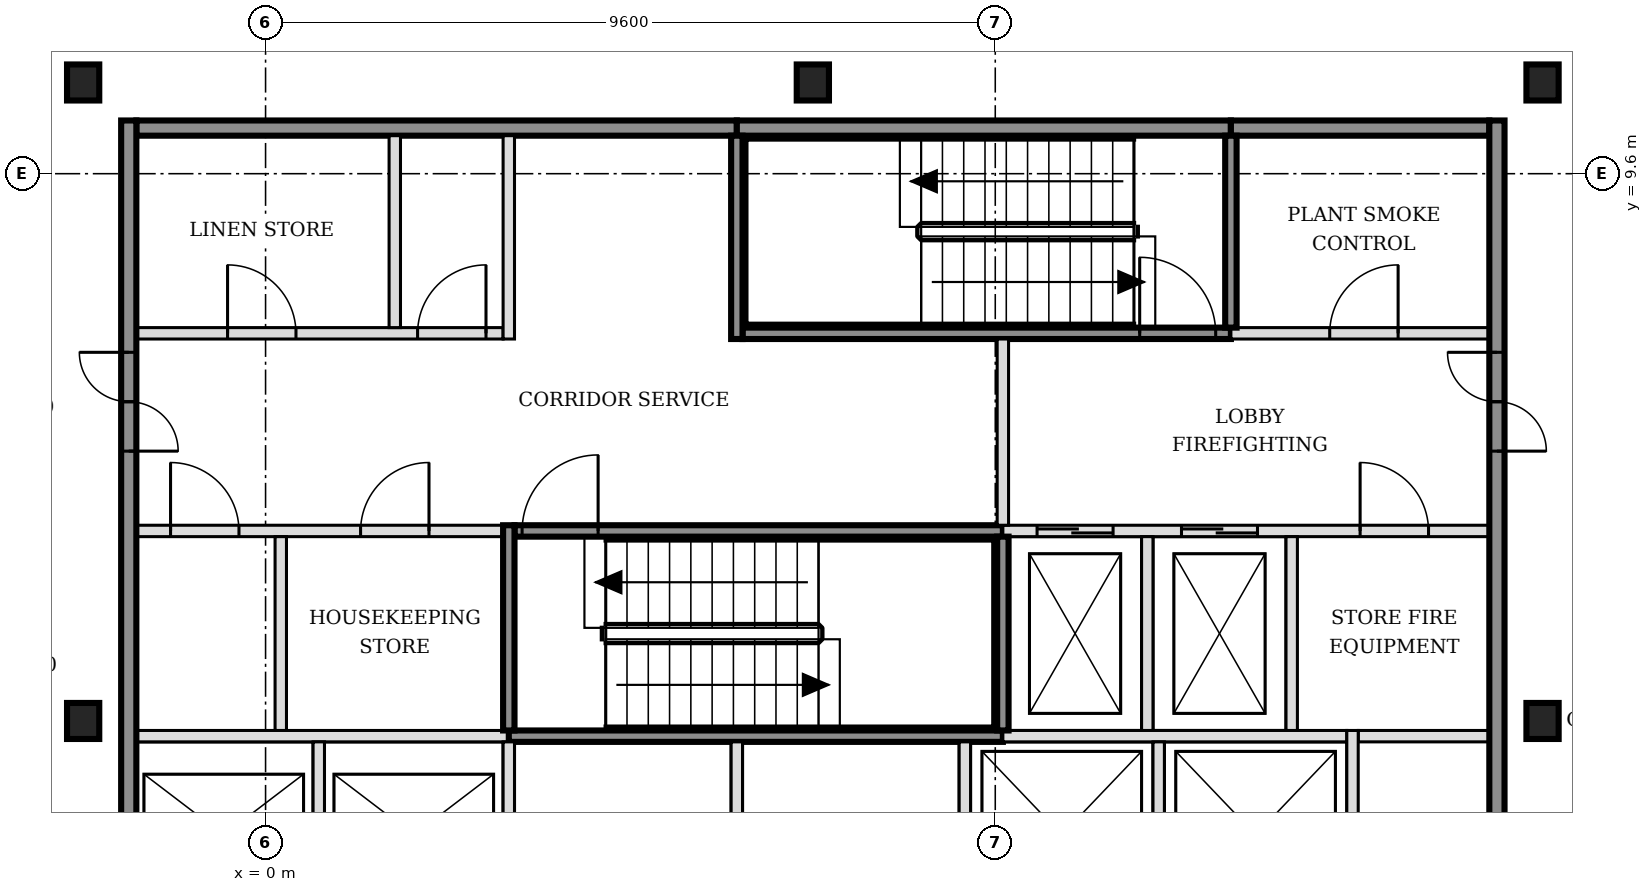
"""IFC4 building model, lengths in metres.
Left out: names, types, materials, properties, quantities, classifications, styles, units other than length and angle.
Written with IfcOpenShell. Run it as: python <this file> out.ifc"""

import sys

from ifc_helpers import new_model, si_unit, direction, frame, frame_2d, origin, origin_2d, place, context, subcontext, project, spatial, rectangle, i_section, extrude, element, fill, save


model = new_model("IFC4")
c1 = context("Model", 3, precision=1e-05, world=origin(), true_north=direction((0.0, 1.0)))
c2 = subcontext(c1, "Body", "Model", "MODEL_VIEW")
j1 = project(units=[si_unit("LENGTHUNIT", "METRE"), si_unit("PLANEANGLEUNIT", "RADIAN")], contexts=[c1])
p1 = place(None, origin())
s1 = spatial("IfcSite", under=j1, at=p1, CompositionType="ELEMENT")
p2 = place(p1, origin())
s2 = spatial("IfcBuilding", under=s1, at=p2, CompositionType="ELEMENT")
p3 = place(p2, frame((0.0, 0.0, 112.2)))
s3 = spatial("IfcBuildingStorey", under=s2, at=p3, CompositionType="ELEMENT", Elevation=112.2)
for number, where, z_axis, x_axis in (
    (1, (-2.4, 2.4, -0.15), (0.0, 0.0, 1.0), (1.0, 0.0, 0.0)),
    (2, (16.8, 2.4, -0.15), (0.0, 0.0, 1.0), (1.0, 0.0, 0.0)),
    (3, (-2.4, 10.8, -0.15), (0.0, 0.0, 1.0), (1.0, 0.0, 0.0)),
    (4, (7.2, 10.8, -0.15), (0.0, 0.0, 1.0), (1.0, 0.0, 0.0)),
    (5, (16.8, 10.8, -0.15), (0.0, 0.0, 1.0), (1.0, 0.0, 0.0)),
):
    element("IfcColumn", number, at=place(p3, frame(where, z_axis=z_axis, x_axis=x_axis)), inside=s3, PredefinedType="COLUMN", context=c2, shape_type="SweptSolid", body=[
        extrude(i_section(OverallWidth=0.424, OverallDepth=0.474, WebThickness=0.048, FlangeThickness=0.077, FilletRadius=0.015, at=origin_2d()), origin(), (0.0, 0.0, 1.0), 3.6),
    ])
p4 = place(p3, frame((-1.7, 2.2, 0.0), z_axis=(0.0, 0.0, 1.0), x_axis=(1.0, 0.0, 0.0)))
e6 = element("IfcWall", 6, at=p4, inside=s3, PredefinedType="SOLIDWALL", context=c2, shape_type="SweptSolid", body=[
    extrude(rectangle(XDim=4.9, YDim=0.15, at=frame_2d((2.45, 0.0))), origin(), (0.0, 0.0, 1.0), 3.45),
])
p5 = place(p3, frame((3.2, 2.2, 0.0), z_axis=(0.0, 0.0, 1.0), x_axis=(1.0, 0.0, 0.0)))
e7 = element("IfcWall", 7, at=p5, inside=s3, PredefinedType="SOLIDWALL", context=c2, shape_type="SweptSolid", body=[
    extrude(rectangle(XDim=6.5, YDim=0.15, at=frame_2d((3.25, 0.0))), origin(), (0.0, 0.0, 1.0), 3.45),
])
p6 = place(p3, frame((9.7, 2.2, 0.0), z_axis=(0.0, 0.0, 1.0), x_axis=(1.0, 0.0, 0.0)))
e8 = element("IfcWall", 8, at=p6, inside=s3, PredefinedType="SOLIDWALL", context=c2, shape_type="SweptSolid", body=[
    extrude(rectangle(XDim=4.525, YDim=0.15, at=frame_2d((2.263, 0.0))), origin(), (0.0, 0.0, 1.0), 3.45),
])
p7 = place(p3, frame((14.375, 2.2, 0.0), z_axis=(0.0, 0.0, 1.0), x_axis=(1.0, 0.0, 0.0)))
e9 = element("IfcWall", 9, at=p7, inside=s3, PredefinedType="PARTITIONING", context=c2, shape_type="SweptSolid", body=[
    extrude(rectangle(XDim=1.725, YDim=0.15, at=frame_2d((0.863, 0.0))), origin(), (0.0, 0.0, 1.0), 3.45),
])
p8 = place(p3, frame((-1.7, 4.9, 0.0), z_axis=(0.0, 0.0, 1.0), x_axis=(1.0, 0.0, 0.0)))
e10 = element("IfcWall", 10, at=p8, inside=s3, PredefinedType="PARTITIONING", context=c2, shape_type="SweptSolid", body=[
    extrude(rectangle(XDim=4.825, YDim=0.15, at=frame_2d((2.413, 0.0))), origin(), (0.0, 0.0, 1.0), 3.45),
])
p9 = place(p8, frame((0.45, 0.0, 0.0)))
e11 = element("IfcOpeningElement", 11, at=p9, cuts=e10, PredefinedType="OPENING", context=c2, shape_type="SweptSolid", body=[
    extrude(rectangle(XDim=0.9, YDim=2.1, at=frame_2d((0.45, 1.05))), frame((0.0, 0.085, 0.0), z_axis=(0.0, -1.0, 0.0), x_axis=(1.0, 0.0, 0.0)), (0.0, 0.0, 1.0), 0.17),
])
p10 = place(p8, frame((2.95, 0.0, 0.0)))
e12 = element("IfcOpeningElement", 12, at=p10, cuts=e10, PredefinedType="OPENING", context=c2, shape_type="SweptSolid", body=[
    extrude(rectangle(XDim=0.9, YDim=2.1, at=frame_2d((0.45, 1.05))), frame((0.0, 0.085, 0.0), z_axis=(0.0, -1.0, 0.0), x_axis=(1.0, 0.0, 0.0)), (0.0, 0.0, 1.0), 0.17),
])
p11 = place(p3, frame((3.275, 4.9, 0.0), z_axis=(0.0, 0.0, 1.0), x_axis=(1.0, 0.0, 0.0)))
e13 = element("IfcWall", 13, at=p11, inside=s3, PredefinedType="SOLIDWALL", context=c2, shape_type="SweptSolid", body=[
    extrude(rectangle(XDim=6.425, YDim=0.15, at=frame_2d((3.212, 0.0))), origin(), (0.0, 0.0, 1.0), 3.45),
])
p12 = place(p11, frame((0.1, 0.0, 0.0)))
e14 = element("IfcOpeningElement", 14, at=p12, cuts=e13, PredefinedType="OPENING", context=c2, shape_type="SweptSolid", body=[
    extrude(rectangle(XDim=1.0, YDim=2.1, at=frame_2d((0.5, 1.05))), frame((0.0, 0.085, 0.0), z_axis=(0.0, -1.0, 0.0), x_axis=(1.0, 0.0, 0.0)), (0.0, 0.0, 1.0), 0.17),
])
p13 = place(p3, frame((9.7, 4.9, 0.0), z_axis=(0.0, 0.0, 1.0), x_axis=(1.0, 0.0, 0.0)))
e15 = element("IfcWall", 15, at=p13, inside=s3, PredefinedType="SOLIDWALL", context=c2, shape_type="SweptSolid", body=[
    extrude(rectangle(XDim=6.4, YDim=0.15, at=frame_2d((3.2, 0.0))), origin(), (0.0, 0.0, 1.0), 3.45),
])
p14 = place(p13, frame((0.45, 0.0, 0.0)))
e16 = element("IfcOpeningElement", 16, at=p14, cuts=e15, PredefinedType="OPENING", context=c2, shape_type="SweptSolid", body=[
    extrude(rectangle(XDim=1.0, YDim=2.1, at=frame_2d((0.5, 1.05))), frame((0.0, 0.085, 0.0), z_axis=(0.0, -1.0, 0.0), x_axis=(1.0, 0.0, 0.0)), (0.0, 0.0, 1.0), 0.17),
])
p15 = place(p13, frame((2.35, 0.0, 0.0)))
e17 = element("IfcOpeningElement", 17, at=p15, cuts=e15, PredefinedType="OPENING", context=c2, shape_type="SweptSolid", body=[
    extrude(rectangle(XDim=1.0, YDim=2.1, at=frame_2d((0.5, 1.05))), frame((0.0, 0.085, 0.0), z_axis=(0.0, -1.0, 0.0), x_axis=(1.0, 0.0, 0.0)), (0.0, 0.0, 1.0), 0.17),
])
p16 = place(p13, frame((4.7, 0.0, 0.0)))
e18 = element("IfcOpeningElement", 18, at=p16, cuts=e15, PredefinedType="OPENING", context=c2, shape_type="SweptSolid", body=[
    extrude(rectangle(XDim=0.9, YDim=2.1, at=frame_2d((0.45, 1.05))), frame((0.0, 0.085, 0.0), z_axis=(0.0, -1.0, 0.0), x_axis=(1.0, 0.0, 0.0)), (0.0, 0.0, 1.0), 0.17),
])
p17 = place(p3, frame((-1.7, 7.5, 0.0), z_axis=(0.0, 0.0, 1.0), x_axis=(1.0, 0.0, 0.0)))
e19 = element("IfcWall", 19, at=p17, inside=s3, PredefinedType="PARTITIONING", context=c2, shape_type="SweptSolid", body=[
    extrude(rectangle(XDim=4.825, YDim=0.15, at=frame_2d((2.413, 0.0))), origin(), (0.0, 0.0, 1.0), 3.45),
])
p18 = place(p17, frame((1.2, 0.0, 0.0)))
e20 = element("IfcOpeningElement", 20, at=p18, cuts=e19, PredefinedType="OPENING", context=c2, shape_type="SweptSolid", body=[
    extrude(rectangle(XDim=0.9, YDim=2.1, at=frame_2d((0.45, 1.05))), frame((0.0, 0.085, 0.0), z_axis=(0.0, -1.0, 0.0), x_axis=(1.0, 0.0, 0.0)), (0.0, 0.0, 1.0), 0.17),
])
p19 = place(p17, frame((3.7, 0.0, 0.0)))
e21 = element("IfcOpeningElement", 21, at=p19, cuts=e19, PredefinedType="OPENING", context=c2, shape_type="SweptSolid", body=[
    extrude(rectangle(XDim=0.9, YDim=2.1, at=frame_2d((0.45, 1.05))), frame((0.0, 0.085, 0.0), z_axis=(0.0, -1.0, 0.0), x_axis=(1.0, 0.0, 0.0)), (0.0, 0.0, 1.0), 0.17),
])
p20 = place(p3, frame((6.275, 7.5, 0.0), z_axis=(0.0, 0.0, 1.0), x_axis=(1.0, 0.0, 0.0)))
e22 = element("IfcWall", 22, at=p20, inside=s3, PredefinedType="SOLIDWALL", context=c2, shape_type="SweptSolid", body=[
    extrude(rectangle(XDim=6.425, YDim=0.15, at=frame_2d((3.212, 0.0))), origin(), (0.0, 0.0, 1.0), 3.45),
])
p21 = place(p20, frame((5.225, 0.0, 0.0)))
e23 = element("IfcOpeningElement", 23, at=p21, cuts=e22, PredefinedType="OPENING", context=c2, shape_type="SweptSolid", body=[
    extrude(rectangle(XDim=1.0, YDim=2.1, at=frame_2d((0.5, 1.05))), frame((0.0, 0.085, 0.0), z_axis=(0.0, -1.0, 0.0), x_axis=(1.0, 0.0, 0.0)), (0.0, 0.0, 1.0), 0.17),
])
p22 = place(p3, frame((12.7, 7.5, 0.0), z_axis=(0.0, 0.0, 1.0), x_axis=(1.0, 0.0, 0.0)))
e24 = element("IfcWall", 24, at=p22, inside=s3, PredefinedType="SOLIDWALL", context=c2, shape_type="SweptSolid", body=[
    extrude(rectangle(XDim=3.4, YDim=0.15, at=frame_2d((1.7, 0.0))), origin(), (0.0, 0.0, 1.0), 3.45),
])
p23 = place(p22, frame((1.3, 0.0, 0.0)))
e25 = element("IfcOpeningElement", 25, at=p23, cuts=e24, PredefinedType="OPENING", context=c2, shape_type="SweptSolid", body=[
    extrude(rectangle(XDim=0.9, YDim=2.1, at=frame_2d((0.45, 1.05))), frame((0.0, 0.085, 0.0), z_axis=(0.0, -1.0, 0.0), x_axis=(1.0, 0.0, 0.0)), (0.0, 0.0, 1.0), 0.17),
])
p24 = place(p3, frame((-1.7, 10.2, 0.0), z_axis=(0.0, 0.0, 1.0), x_axis=(1.0, 0.0, 0.0)))
e26 = element("IfcWall", 26, at=p24, inside=s3, PredefinedType="SOLIDWALL", context=c2, shape_type="SweptSolid", body=[
    extrude(rectangle(XDim=7.9, YDim=0.2, at=frame_2d((3.95, 0.0))), origin(), (0.0, 0.0, 1.0), 3.45),
])
p25 = place(p3, frame((6.2, 10.2, 0.0), z_axis=(0.0, 0.0, 1.0), x_axis=(1.0, 0.0, 0.0)))
e27 = element("IfcWall", 27, at=p25, inside=s3, PredefinedType="SOLIDWALL", context=c2, shape_type="SweptSolid", body=[
    extrude(rectangle(XDim=6.5, YDim=0.2, at=frame_2d((3.25, 0.0))), origin(), (0.0, 0.0, 1.0), 3.45),
])
p26 = place(p3, frame((12.7, 10.2, 0.0), z_axis=(0.0, 0.0, 1.0), x_axis=(1.0, 0.0, 0.0)))
e28 = element("IfcWall", 28, at=p26, inside=s3, PredefinedType="SOLIDWALL", context=c2, shape_type="SweptSolid", body=[
    extrude(rectangle(XDim=3.4, YDim=0.2, at=frame_2d((1.7, 0.0))), origin(), (0.0, 0.0, 1.0), 3.45),
])
p27 = place(p3, frame((-1.8, -5.5, 0.0), z_axis=(0.0, 0.0, 1.0), x_axis=(0.0, 1.0, 0.0)))
e29 = element("IfcWall", 29, at=p27, inside=s3, PredefinedType="SOLIDWALL", context=c2, shape_type="SweptSolid", body=[
    extrude(rectangle(XDim=15.8, YDim=0.2, at=frame_2d((7.9, 0.0))), origin(), (0.0, 0.0, 1.0), 3.45),
])
p28 = place(p27, frame((3.05, 0.0, 0.0)))
e30 = element("IfcOpeningElement", 30, at=p28, cuts=e29, PredefinedType="OPENING", context=c2, shape_type="SweptSolid", body=[
    extrude(rectangle(XDim=1.3, YDim=2.1, at=frame_2d((0.65, 1.05))), frame((0.0, 0.11, 0.0), z_axis=(0.0, -1.0, 0.0), x_axis=(1.0, 0.0, 0.0)), (0.0, 0.0, 1.0), 0.22),
])
p29 = place(p27, frame((11.45, 0.0, 0.0)))
e31 = element("IfcOpeningElement", 31, at=p29, cuts=e29, PredefinedType="OPENING", context=c2, shape_type="SweptSolid", body=[
    extrude(rectangle(XDim=1.3, YDim=2.1, at=frame_2d((0.65, 1.05))), frame((0.0, 0.11, 0.0), z_axis=(0.0, -1.0, 0.0), x_axis=(1.0, 0.0, 0.0)), (0.0, 0.0, 1.0), 0.22),
])
p30 = place(p3, frame((0.2, 2.275, 0.0), z_axis=(0.0, 0.0, 1.0), x_axis=(0.0, 1.0, 0.0)))
e32 = element("IfcWall", 32, at=p30, inside=s3, PredefinedType="PARTITIONING", context=c2, shape_type="SweptSolid", body=[
    extrude(rectangle(XDim=2.55, YDim=0.15, at=frame_2d((1.275, 0.0))), origin(), (0.0, 0.0, 1.0), 3.45),
])
p31 = place(p3, frame((0.7, -0.325, 0.0), z_axis=(0.0, 0.0, 1.0), x_axis=(0.0, 1.0, 0.0)))
e33 = element("IfcWall", 33, at=p31, inside=s3, PredefinedType="SOLIDWALL", context=c2, shape_type="SweptSolid", body=[
    extrude(rectangle(XDim=2.45, YDim=0.15, at=frame_2d((1.225, 0.0))), origin(), (0.0, 0.0, 1.0), 3.45),
])
p32 = place(p3, frame((1.7, 7.575, 0.0), z_axis=(0.0, 0.0, 1.0), x_axis=(0.0, 1.0, 0.0)))
e34 = element("IfcWall", 34, at=p32, inside=s3, PredefinedType="PARTITIONING", context=c2, shape_type="SweptSolid", body=[
    extrude(rectangle(XDim=2.525, YDim=0.15, at=frame_2d((1.263, 0.0))), origin(), (0.0, 0.0, 1.0), 3.45),
])
p33 = place(p3, frame((3.2, -0.325, 0.0), z_axis=(0.0, 0.0, 1.0), x_axis=(0.0, 1.0, 0.0)))
e35 = element("IfcWall", 35, at=p33, inside=s3, PredefinedType="SOLIDWALL", context=c2, shape_type="SweptSolid", body=[
    extrude(rectangle(XDim=2.45, YDim=0.15, at=frame_2d((1.225, 0.0))), origin(), (0.0, 0.0, 1.0), 3.45),
])
p34 = place(p3, frame((3.2, 2.275, 0.0), z_axis=(0.0, 0.0, 1.0), x_axis=(0.0, 1.0, 0.0)))
e36 = element("IfcWall", 36, at=p34, inside=s3, PredefinedType="SOLIDWALL", context=c2, shape_type="SweptSolid", body=[
    extrude(rectangle(XDim=2.7, YDim=0.15, at=frame_2d((1.35, 0.0))), origin(), (0.0, 0.0, 1.0), 3.45),
])
p35 = place(p3, frame((3.2, 7.425, 0.0), z_axis=(0.0, 0.0, 1.0), x_axis=(0.0, 1.0, 0.0)))
e37 = element("IfcWall", 37, at=p35, inside=s3, PredefinedType="PARTITIONING", context=c2, shape_type="SweptSolid", body=[
    extrude(rectangle(XDim=2.675, YDim=0.15, at=frame_2d((1.337, 0.0))), origin(), (0.0, 0.0, 1.0), 3.45),
])
p36 = place(p3, frame((6.2, -0.325, 0.0), z_axis=(0.0, 0.0, 1.0), x_axis=(0.0, 1.0, 0.0)))
e38 = element("IfcWall", 38, at=p36, inside=s3, PredefinedType="SOLIDWALL", context=c2, shape_type="SweptSolid", body=[
    extrude(rectangle(XDim=2.45, YDim=0.15, at=frame_2d((1.225, 0.0))), origin(), (0.0, 0.0, 1.0), 3.45),
])
p37 = place(p3, frame((6.2, 7.425, 0.0), z_axis=(0.0, 0.0, 1.0), x_axis=(0.0, 1.0, 0.0)))
e39 = element("IfcWall", 39, at=p37, inside=s3, PredefinedType="SOLIDWALL", context=c2, shape_type="SweptSolid", body=[
    extrude(rectangle(XDim=2.675, YDim=0.15, at=frame_2d((1.337, 0.0))), origin(), (0.0, 0.0, 1.0), 3.45),
])
p38 = place(p3, frame((9.2, -0.325, 0.0), z_axis=(0.0, 0.0, 1.0), x_axis=(0.0, 1.0, 0.0)))
e40 = element("IfcWall", 40, at=p38, inside=s3, PredefinedType="SOLIDWALL", context=c2, shape_type="SweptSolid", body=[
    extrude(rectangle(XDim=2.45, YDim=0.15, at=frame_2d((1.225, 0.0))), origin(), (0.0, 0.0, 1.0), 3.45),
])
p39 = place(p3, frame((9.7, 2.275, 0.0), z_axis=(0.0, 0.0, 1.0), x_axis=(0.0, 1.0, 0.0)))
e41 = element("IfcWall", 41, at=p39, inside=s3, PredefinedType="SOLIDWALL", context=c2, shape_type="SweptSolid", body=[
    extrude(rectangle(XDim=2.55, YDim=0.15, at=frame_2d((1.275, 0.0))), origin(), (0.0, 0.0, 1.0), 3.45),
])
p40 = place(p3, frame((9.7, 4.975, 0.0), z_axis=(0.0, 0.0, 1.0), x_axis=(0.0, 1.0, 0.0)))
e42 = element("IfcWall", 42, at=p40, inside=s3, PredefinedType="SOLIDWALL", context=c2, shape_type="SweptSolid", body=[
    extrude(rectangle(XDim=2.45, YDim=0.15, at=frame_2d((1.225, 0.0))), origin(), (0.0, 0.0, 1.0), 3.45),
])
p41 = place(p3, frame((11.6, 2.275, 0.0), z_axis=(0.0, 0.0, 1.0), x_axis=(0.0, 1.0, 0.0)))
e43 = element("IfcWall", 43, at=p41, inside=s3, PredefinedType="SOLIDWALL", context=c2, shape_type="SweptSolid", body=[
    extrude(rectangle(XDim=2.55, YDim=0.15, at=frame_2d((1.275, 0.0))), origin(), (0.0, 0.0, 1.0), 3.45),
])
p42 = place(p3, frame((11.75, -0.325, 0.0), z_axis=(0.0, 0.0, 1.0), x_axis=(0.0, 1.0, 0.0)))
e44 = element("IfcWall", 44, at=p42, inside=s3, PredefinedType="SOLIDWALL", context=c2, shape_type="SweptSolid", body=[
    extrude(rectangle(XDim=2.45, YDim=0.15, at=frame_2d((1.225, 0.0))), origin(), (0.0, 0.0, 1.0), 3.45),
])
p43 = place(p3, frame((12.7, 7.575, 0.0), z_axis=(0.0, 0.0, 1.0), x_axis=(0.0, 1.0, 0.0)))
e45 = element("IfcWall", 45, at=p43, inside=s3, PredefinedType="SOLIDWALL", context=c2, shape_type="SweptSolid", body=[
    extrude(rectangle(XDim=2.525, YDim=0.15, at=frame_2d((1.263, 0.0))), origin(), (0.0, 0.0, 1.0), 3.45),
])
p44 = place(p3, frame((13.5, 2.275, 0.0), z_axis=(0.0, 0.0, 1.0), x_axis=(0.0, 1.0, 0.0)))
e46 = element("IfcWall", 46, at=p44, inside=s3, PredefinedType="SOLIDWALL", context=c2, shape_type="SweptSolid", body=[
    extrude(rectangle(XDim=2.55, YDim=0.15, at=frame_2d((1.275, 0.0))), origin(), (0.0, 0.0, 1.0), 3.45),
])
p45 = place(p3, frame((14.3, -0.475, 0.0), z_axis=(0.0, 0.0, 1.0), x_axis=(0.0, 1.0, 0.0)))
e47 = element("IfcWall", 47, at=p45, inside=s3, PredefinedType="SOLIDWALL", context=c2, shape_type="SweptSolid", body=[
    extrude(rectangle(XDim=2.75, YDim=0.15, at=frame_2d((1.375, 0.0))), origin(), (0.0, 0.0, 1.0), 3.45),
])
p46 = place(p3, frame((16.2, -5.5, 0.0), z_axis=(0.0, 0.0, 1.0), x_axis=(0.0, 1.0, 0.0)))
e48 = element("IfcWall", 48, at=p46, inside=s3, PredefinedType="SOLIDWALL", context=c2, shape_type="SweptSolid", body=[
    extrude(rectangle(XDim=15.8, YDim=0.2, at=frame_2d((7.9, 0.0))), origin(), (0.0, 0.0, 1.0), 3.45),
])
p47 = place(p46, frame((3.05, 0.0, 0.0)))
e49 = element("IfcOpeningElement", 49, at=p47, cuts=e48, PredefinedType="OPENING", context=c2, shape_type="SweptSolid", body=[
    extrude(rectangle(XDim=1.3, YDim=2.1, at=frame_2d((0.65, 1.05))), frame((0.0, 0.11, 0.0), z_axis=(0.0, -1.0, 0.0), x_axis=(1.0, 0.0, 0.0)), (0.0, 0.0, 1.0), 0.22),
])
p48 = place(p46, frame((11.45, 0.0, 0.0)))
e50 = element("IfcOpeningElement", 50, at=p48, cuts=e48, PredefinedType="OPENING", context=c2, shape_type="SweptSolid", body=[
    extrude(rectangle(XDim=1.3, YDim=2.1, at=frame_2d((0.65, 1.05))), frame((0.0, 0.11, 0.0), z_axis=(0.0, -1.0, 0.0), x_axis=(1.0, 0.0, 0.0)), (0.0, 0.0, 1.0), 0.22),
])
p49 = place(p14, origin())
e51 = element("IfcDoor", 51, at=p49, inside=s3, OperationType="DOUBLE_DOOR_SLIDING", PredefinedType="DOOR", context=c2, shape_type="SweptSolid", body=[
    extrude(rectangle(XDim=1.0, YDim=2.1, at=frame_2d((0.5, 1.05))), frame((0.0, 0.025, 0.0), z_axis=(0.0, -1.0, 0.0), x_axis=(1.0, 0.0, 0.0)), (0.0, 0.0, 1.0), 0.05),
])
fill(e16, e51)
p50 = place(p15, origin())
e52 = element("IfcDoor", 52, at=p50, inside=s3, OperationType="DOUBLE_DOOR_SLIDING", PredefinedType="DOOR", context=c2, shape_type="SweptSolid", body=[
    extrude(rectangle(XDim=1.0, YDim=2.1, at=frame_2d((0.5, 1.05))), frame((0.0, 0.025, 0.0), z_axis=(0.0, -1.0, 0.0), x_axis=(1.0, 0.0, 0.0)), (0.0, 0.0, 1.0), 0.05),
])
fill(e17, e52)
p51 = place(p12, origin())
e53 = element("IfcDoor", 53, at=p51, inside=s3, OperationType="SINGLE_SWING_RIGHT", PredefinedType="DOOR", context=c2, shape_type="SweptSolid", body=[
    extrude(rectangle(XDim=1.0, YDim=2.1, at=frame_2d((0.5, 1.05))), frame((0.0, 0.025, 0.0), z_axis=(0.0, -1.0, 0.0), x_axis=(1.0, 0.0, 0.0)), (0.0, 0.0, 1.0), 0.05),
])
fill(e14, e53)
p52 = place(p21, origin())
e54 = element("IfcDoor", 54, at=p52, inside=s3, OperationType="SINGLE_SWING_LEFT", PredefinedType="DOOR", context=c2, shape_type="SweptSolid", body=[
    extrude(rectangle(XDim=1.0, YDim=2.1, at=frame_2d((0.5, 1.05))), frame((0.0, 0.025, 0.0), z_axis=(0.0, -1.0, 0.0), x_axis=(1.0, 0.0, 0.0)), (0.0, 0.0, 1.0), 0.05),
])
fill(e23, e54)
p53 = place(p29, origin())
e55 = element("IfcDoor", 55, at=p53, inside=s3, OperationType="DOUBLE_DOOR_SINGLE_SWING", PredefinedType="DOOR", context=c2, shape_type="SweptSolid", body=[
    extrude(rectangle(XDim=1.3, YDim=2.1, at=frame_2d((0.65, 1.05))), frame((0.0, 0.025, 0.0), z_axis=(0.0, -1.0, 0.0), x_axis=(1.0, 0.0, 0.0)), (0.0, 0.0, 1.0), 0.05),
])
fill(e31, e55)
p54 = place(p48, origin())
e56 = element("IfcDoor", 56, at=p54, inside=s3, OperationType="DOUBLE_DOOR_SINGLE_SWING", PredefinedType="DOOR", context=c2, shape_type="SweptSolid", body=[
    extrude(rectangle(XDim=1.3, YDim=2.1, at=frame_2d((0.65, 1.05))), frame((0.0, 0.025, 0.0), z_axis=(0.0, -1.0, 0.0), x_axis=(1.0, 0.0, 0.0)), (0.0, 0.0, 1.0), 0.05),
])
fill(e50, e56)
p55 = place(p16, origin())
e57 = element("IfcDoor", 57, at=p55, inside=s3, OperationType="SINGLE_SWING_LEFT", PredefinedType="DOOR", context=c2, shape_type="SweptSolid", body=[
    extrude(rectangle(XDim=0.9, YDim=2.1, at=frame_2d((0.45, 1.05))), frame((0.0, 0.025, 0.0), z_axis=(0.0, -1.0, 0.0), x_axis=(1.0, 0.0, 0.0)), (0.0, 0.0, 1.0), 0.05),
])
fill(e18, e57)
p56 = place(p23, origin())
e58 = element("IfcDoor", 58, at=p56, inside=s3, OperationType="SINGLE_SWING_RIGHT", PredefinedType="DOOR", context=c2, shape_type="SweptSolid", body=[
    extrude(rectangle(XDim=0.9, YDim=2.1, at=frame_2d((0.45, 1.05))), frame((0.0, 0.025, 0.0), z_axis=(0.0, -1.0, 0.0), x_axis=(1.0, 0.0, 0.0)), (0.0, 0.0, 1.0), 0.05),
])
fill(e25, e58)
p57 = place(p9, origin())
e59 = element("IfcDoor", 59, at=p57, inside=s3, OperationType="SINGLE_SWING_LEFT", PredefinedType="DOOR", context=c2, shape_type="SweptSolid", body=[
    extrude(rectangle(XDim=0.9, YDim=2.1, at=frame_2d((0.45, 1.05))), frame((0.0, 0.025, 0.0), z_axis=(0.0, -1.0, 0.0), x_axis=(1.0, 0.0, 0.0)), (0.0, 0.0, 1.0), 0.05),
])
fill(e11, e59)
p58 = place(p10, origin())
e60 = element("IfcDoor", 60, at=p58, inside=s3, OperationType="SINGLE_SWING_RIGHT", PredefinedType="DOOR", context=c2, shape_type="SweptSolid", body=[
    extrude(rectangle(XDim=0.9, YDim=2.1, at=frame_2d((0.45, 1.05))), frame((0.0, 0.025, 0.0), z_axis=(0.0, -1.0, 0.0), x_axis=(1.0, 0.0, 0.0)), (0.0, 0.0, 1.0), 0.05),
])
fill(e12, e60)
p59 = place(p18, origin())
e61 = element("IfcDoor", 61, at=p59, inside=s3, OperationType="SINGLE_SWING_LEFT", PredefinedType="DOOR", context=c2, shape_type="SweptSolid", body=[
    extrude(rectangle(XDim=0.9, YDim=2.1, at=frame_2d((0.45, 1.05))), frame((0.0, 0.025, 0.0), z_axis=(0.0, -1.0, 0.0), x_axis=(1.0, 0.0, 0.0)), (0.0, 0.0, 1.0), 0.05),
])
fill(e20, e61)
p60 = place(p19, origin())
e62 = element("IfcDoor", 62, at=p60, inside=s3, OperationType="SINGLE_SWING_RIGHT", PredefinedType="DOOR", context=c2, shape_type="SweptSolid", body=[
    extrude(rectangle(XDim=0.9, YDim=2.1, at=frame_2d((0.45, 1.05))), frame((0.0, 0.025, 0.0), z_axis=(0.0, -1.0, 0.0), x_axis=(1.0, 0.0, 0.0)), (0.0, 0.0, 1.0), 0.05),
])
fill(e21, e62)
save(model, sys.argv[1])
